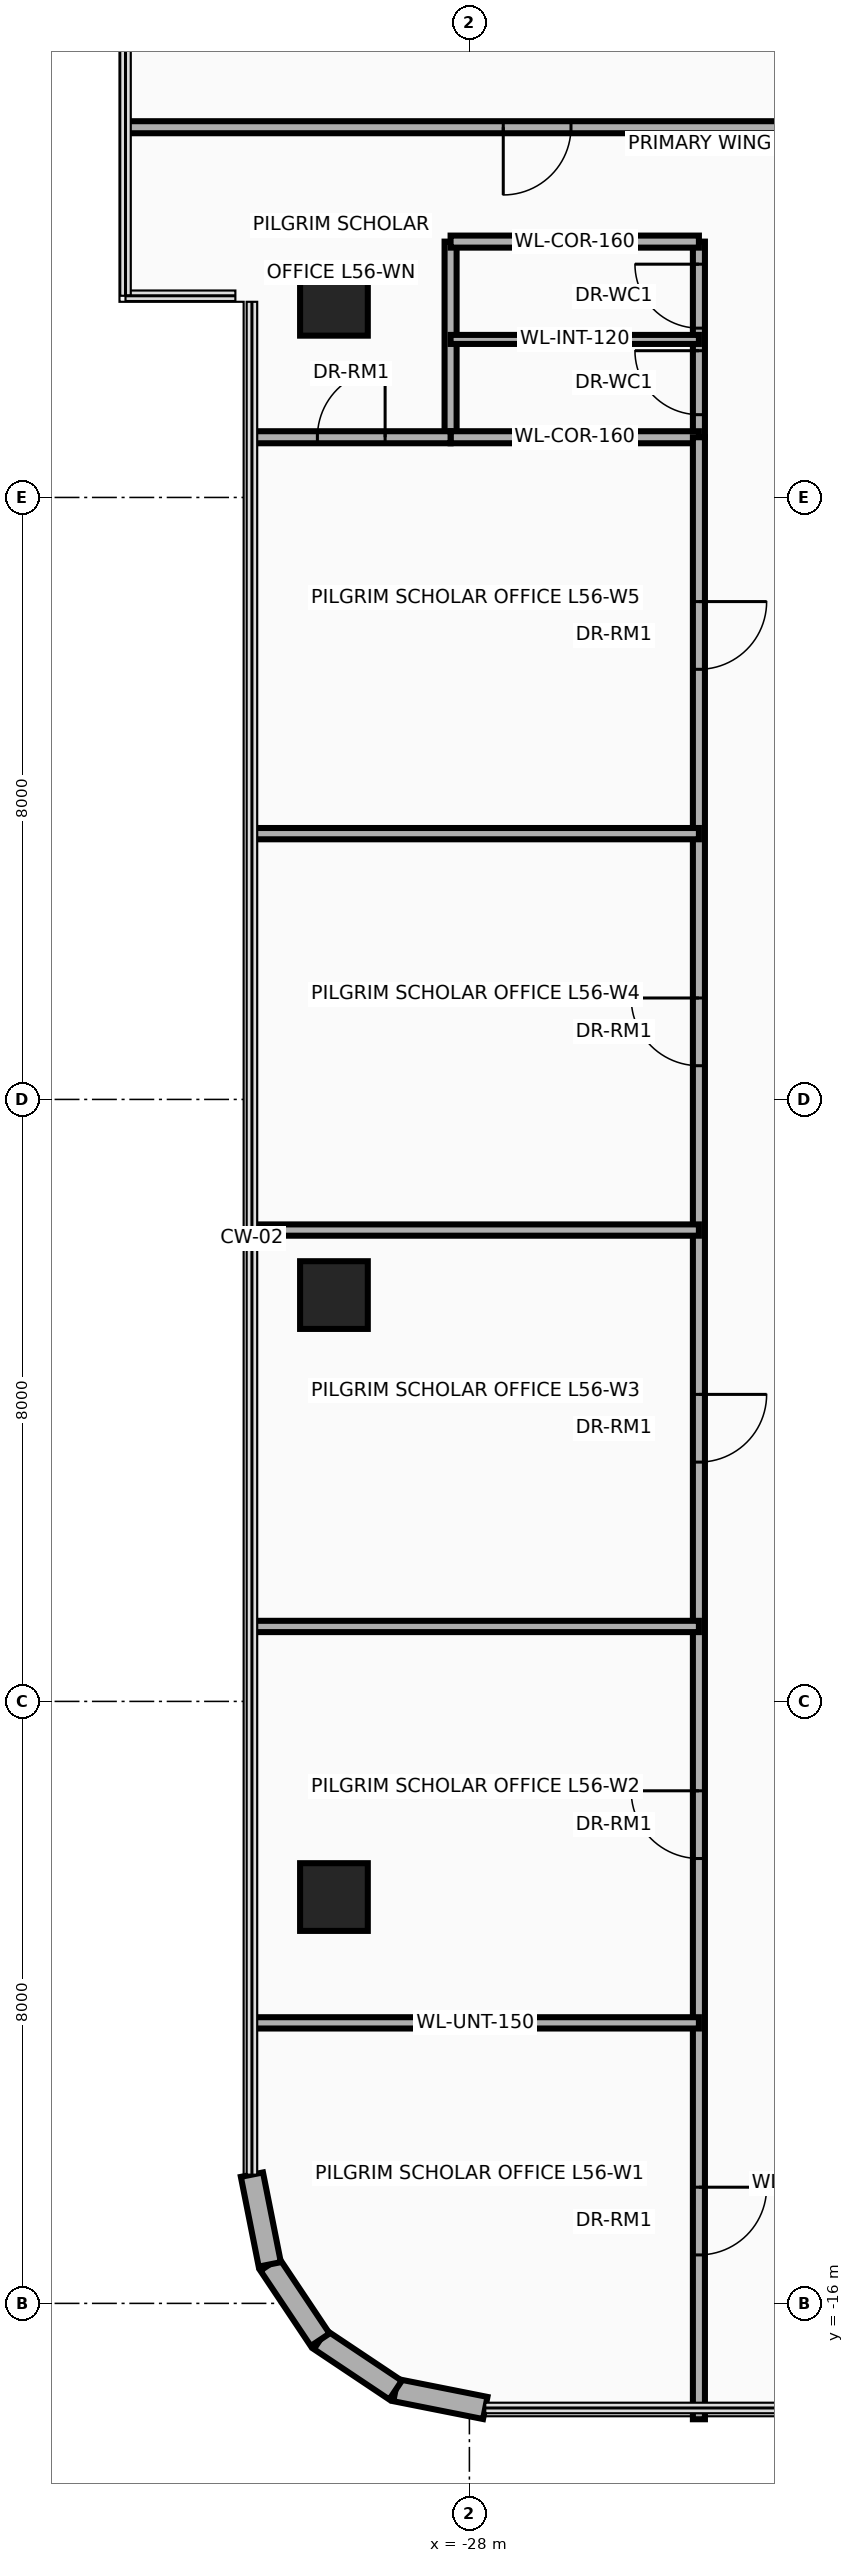
"""IFC4 building model, lengths in metres.
Left out: names, types, materials, properties, quantities, classifications, styles, units other than length and angle.
Written with IfcOpenShell. Run it as: python <this file> out.ifc"""

import sys

from ifc_helpers import new_model, si_unit, direction, frame, frame_2d, origin, origin_2d, place, context, subcontext, project, spatial, rectangle, extrude, source, transform, mapped, element, fill, save


model = new_model("IFC4")
c1 = context("Model", 3, precision=1e-05, world=origin(), true_north=direction((0.0, 1.0)))
c2 = subcontext(c1, "Body", "Model", "MODEL_VIEW")
j1 = project(units=[si_unit("LENGTHUNIT", "METRE"), si_unit("PLANEANGLEUNIT", "RADIAN")], contexts=[c1])
p1 = place(None, origin())
s1 = spatial("IfcSite", under=j1, at=p1, CompositionType="ELEMENT")
p2 = place(p1, origin())
s2 = spatial("IfcBuilding", under=s1, at=p2, CompositionType="ELEMENT")
p3 = place(p2, frame((0.0, 0.0, 219.5)))
s3 = spatial("IfcBuildingStorey", under=s2, at=p3, CompositionType="ELEMENT", Elevation=219.5)
m1 = source(origin(), c2, "Body", "SweptSolid", [
    extrude(rectangle(XDim=0.9, YDim=0.9, at=origin_2d()), origin(), (0.0, 0.0, 1.0), 3.5),
])
for number, where, z_axis, x_axis in (
    (1, (-29.8, -10.6, 0.0), (0.0, 0.0, 1.0), (1.0, 0.0, 0.0)),
    (2, (-29.8, -2.6, 0.0), (0.0, 0.0, 1.0), (1.0, 0.0, 0.0)),
    (3, (-29.8, 10.6, 0.0), (0.0, 0.0, 1.0), (1.0, 0.0, 0.0)),
):
    element("IfcColumn", number, at=place(p3, frame(where, z_axis=z_axis, x_axis=x_axis)), inside=s3, PredefinedType="COLUMN", context=c2, shape_type="MappedRepresentation", body=[
        mapped(m1, transform((0.0, 0.0, 0.0), x_axis=(1.0, 0.0, 0.0), y_axis=(0.0, 1.0, 0.0), z_axis=(0.0, 0.0, 1.0), scale=1.0)),
    ])
p4 = place(p3, frame((-27.789, -17.39, 0.0), z_axis=(0.0, 0.0, 1.0), x_axis=(-0.980804027463, 0.194996050505, 0.0)))
e4 = element("IfcWall", 4, at=p4, inside=s3, PredefinedType="SOLIDWALL", context=c2, shape_type="SweptSolid", body=[
    extrude(rectangle(XDim=1.216, YDim=0.3, at=frame_2d((0.608, 0.0))), origin(), (0.0, 0.0, 1.0), 3.26),
])
for number, where, z_axis, x_axis in (
    (5, (-28.982, -17.153, 0.0), (0.0, 0.0, 1.0), (-0.831, 0.556, 0.0)),
    (6, (-29.983, -16.483, 0.0), (0.0, 0.0, 1.0), (-0.556, 0.831, 0.0)),
):
    element("IfcWall", number, at=place(p3, frame(where, z_axis=z_axis, x_axis=x_axis)), inside=s3, PredefinedType="SOLIDWALL", context=c2, shape_type="SweptSolid", body=[
        extrude(rectangle(XDim=1.205, YDim=0.3, at=frame_2d((0.603, 0.0))), origin(), (0.0, 0.0, 1.0), 3.26),
    ])
p5 = place(p3, frame((-30.653, -15.482, 0.0), z_axis=(0.0, 0.0, 1.0), x_axis=(-0.194996050505, 0.980804027463, 0.0)))
e7 = element("IfcWall", 7, at=p5, inside=s3, PredefinedType="SOLIDWALL", context=c2, shape_type="SweptSolid", body=[
    extrude(rectangle(XDim=1.216, YDim=0.3, at=frame_2d((0.608, 0.0))), origin(), (0.0, 0.0, 1.0), 3.26),
])
p6 = place(p3, frame((-28.25, 8.8, 0.0), z_axis=(0.0, 0.0, 1.0), x_axis=(0.0, 1.0, 0.0)))
e8 = element("IfcWall", 8, at=p6, inside=s3, PredefinedType="PARTITIONING", context=c2, shape_type="SweptSolid", body=[
    extrude(rectangle(XDim=2.6, YDim=0.16, at=frame_2d((1.3, 0.0))), origin(), (0.0, 0.0, 1.0), 2.544),
])
p7 = place(p3, frame((-24.95, 8.8, 0.0), z_axis=(0.0, 0.0, 1.0), x_axis=(0.0, 1.0, 0.0)))
e9 = element("IfcWall", 9, at=p7, inside=s3, PredefinedType="PARTITIONING", context=c2, shape_type="SweptSolid", body=[
    extrude(rectangle(XDim=2.6, YDim=0.16, at=frame_2d((1.3, 0.0))), origin(), (0.0, 0.0, 1.0), 2.544),
])
p8 = place(p7, frame((0.3, 0.0, 0.0)))
e10 = element("IfcOpeningElement", 10, at=p8, cuts=e9, PredefinedType="OPENING", context=c2, shape_type="SweptSolid", body=[
    extrude(rectangle(XDim=0.85, YDim=2.1, at=frame_2d((0.425, 1.05))), frame((0.0, 0.095, 0.0), z_axis=(0.0, -1.0, 0.0), x_axis=(1.0, 0.0, 0.0)), (0.0, 0.0, 1.0), 0.19),
])
p9 = place(p7, frame((1.45, 0.0, 0.0)))
e11 = element("IfcOpeningElement", 11, at=p9, cuts=e9, PredefinedType="OPENING", context=c2, shape_type="SweptSolid", body=[
    extrude(rectangle(XDim=0.85, YDim=2.1, at=frame_2d((0.425, 1.05))), frame((0.0, 0.095, 0.0), z_axis=(0.0, -1.0, 0.0), x_axis=(1.0, 0.0, 0.0)), (0.0, 0.0, 1.0), 0.19),
])
for number, where, z_axis, x_axis in (
    (12, (-28.25, 8.8, 0.0), (0.0, 0.0, 1.0), (1.0, 0.0, 0.0)),
    (13, (-28.25, 11.4, 0.0), (0.0, 0.0, 1.0), (1.0, 0.0, 0.0)),
):
    element("IfcWall", number, at=place(p3, frame(where, z_axis=z_axis, x_axis=x_axis)), inside=s3, PredefinedType="PARTITIONING", context=c2, shape_type="SweptSolid", body=[
        extrude(rectangle(XDim=3.3, YDim=0.16, at=frame_2d((1.65, 0.0))), origin(), (0.0, 0.0, 1.0), 3.26),
    ])
p10 = place(p3, frame((-28.25, 10.1, 0.0), z_axis=(0.0, 0.0, 1.0), x_axis=(1.0, 0.0, 0.0)))
e14 = element("IfcWall", 14, at=p10, inside=s3, PredefinedType="PARTITIONING", context=c2, shape_type="SweptSolid", body=[
    extrude(rectangle(XDim=3.3, YDim=0.12, at=frame_2d((1.65, 0.0))), origin(), (0.0, 0.0, 1.0), 3.26),
])
p11 = place(p3, frame((-24.95, -17.54, 0.0), z_axis=(0.0, 0.0, 1.0), x_axis=(0.0, 1.0, 0.0)))
e15 = element("IfcWall", 15, at=p11, inside=s3, PredefinedType="PARTITIONING", context=c2, shape_type="SweptSolid", body=[
    extrude(rectangle(XDim=26.34, YDim=0.16, at=frame_2d((13.17, 0.0))), origin(), (0.0, 0.0, 1.0), 2.544),
])
p12 = place(p11, frame((2.184, 0.0, 0.0)))
e16 = element("IfcOpeningElement", 16, at=p12, cuts=e15, PredefinedType="OPENING", context=c2, shape_type="SweptSolid", body=[
    extrude(rectangle(XDim=0.9, YDim=2.1, at=frame_2d((0.45, 1.05))), frame((0.0, 0.095, 0.0), z_axis=(0.0, -1.0, 0.0), x_axis=(1.0, 0.0, 0.0)), (0.0, 0.0, 1.0), 0.19),
])
p13 = place(p11, frame((7.452, 0.0, 0.0)))
e17 = element("IfcOpeningElement", 17, at=p13, cuts=e15, PredefinedType="OPENING", context=c2, shape_type="SweptSolid", body=[
    extrude(rectangle(XDim=0.9, YDim=2.1, at=frame_2d((0.45, 1.05))), frame((0.0, 0.095, 0.0), z_axis=(0.0, -1.0, 0.0), x_axis=(1.0, 0.0, 0.0)), (0.0, 0.0, 1.0), 0.19),
])
p14 = place(p11, frame((12.72, 0.0, 0.0)))
e18 = element("IfcOpeningElement", 18, at=p14, cuts=e15, PredefinedType="OPENING", context=c2, shape_type="SweptSolid", body=[
    extrude(rectangle(XDim=0.9, YDim=2.1, at=frame_2d((0.45, 1.05))), frame((0.0, 0.095, 0.0), z_axis=(0.0, -1.0, 0.0), x_axis=(1.0, 0.0, 0.0)), (0.0, 0.0, 1.0), 0.19),
])
p15 = place(p11, frame((17.988, 0.0, 0.0)))
e19 = element("IfcOpeningElement", 19, at=p15, cuts=e15, PredefinedType="OPENING", context=c2, shape_type="SweptSolid", body=[
    extrude(rectangle(XDim=0.9, YDim=2.1, at=frame_2d((0.45, 1.05))), frame((0.0, 0.095, 0.0), z_axis=(0.0, -1.0, 0.0), x_axis=(1.0, 0.0, 0.0)), (0.0, 0.0, 1.0), 0.19),
])
p16 = place(p11, frame((23.256, 0.0, 0.0)))
e20 = element("IfcOpeningElement", 20, at=p16, cuts=e15, PredefinedType="OPENING", context=c2, shape_type="SweptSolid", body=[
    extrude(rectangle(XDim=0.9, YDim=2.1, at=frame_2d((0.45, 1.05))), frame((0.0, 0.095, 0.0), z_axis=(0.0, -1.0, 0.0), x_axis=(1.0, 0.0, 0.0)), (0.0, 0.0, 1.0), 0.19),
])
p17 = place(p3, frame((-30.89, 8.8, 0.0), z_axis=(0.0, 0.0, 1.0), x_axis=(1.0, 0.0, 0.0)))
e21 = element("IfcWall", 21, at=p17, inside=s3, PredefinedType="PARTITIONING", context=c2, shape_type="SweptSolid", body=[
    extrude(rectangle(XDim=2.64, YDim=0.16, at=frame_2d((1.32, 0.0))), origin(), (0.0, 0.0, 1.0), 2.706),
])
p18 = place(p17, frame((0.87, 0.0, 0.0)))
e22 = element("IfcOpeningElement", 22, at=p18, cuts=e21, PredefinedType="OPENING", context=c2, shape_type="SweptSolid", body=[
    extrude(rectangle(XDim=0.9, YDim=2.1, at=frame_2d((0.45, 1.05))), frame((0.0, 0.095, 0.0), z_axis=(0.0, -1.0, 0.0), x_axis=(1.0, 0.0, 0.0)), (0.0, 0.0, 1.0), 0.19),
])
p19 = place(p3, frame((-30.89, -12.272, 0.0), z_axis=(0.0, 0.0, 1.0), x_axis=(1.0, 0.0, 0.0)))
e23 = element("IfcWall", 23, at=p19, inside=s3, PredefinedType="PARTITIONING", context=c2, shape_type="SweptSolid", body=[
    extrude(rectangle(XDim=5.94, YDim=0.15, at=frame_2d((2.97, 0.0))), origin(), (0.0, 0.0, 1.0), 3.26),
])
for number, where, z_axis, x_axis in (
    (24, (-30.89, -7.004, 0.0), (0.0, 0.0, 1.0), (1.0, 0.0, 0.0)),
    (25, (-30.89, -1.736, 0.0), (0.0, 0.0, 1.0), (1.0, 0.0, 0.0)),
    (26, (-30.89, 3.532, 0.0), (0.0, 0.0, 1.0), (1.0, 0.0, 0.0)),
):
    element("IfcWall", number, at=place(p3, frame(where, z_axis=z_axis, x_axis=x_axis)), inside=s3, PredefinedType="PARTITIONING", context=c2, shape_type="SweptSolid", body=[
        extrude(rectangle(XDim=5.94, YDim=0.15, at=frame_2d((2.97, 0.0))), origin(), (0.0, 0.0, 1.0), 2.706),
    ])
p20 = place(p3, frame((-32.54, 12.92, 0.0), z_axis=(0.0, 0.0, 1.0), x_axis=(1.0, 0.0, 0.0)))
e27 = element("IfcWall", 27, at=p20, inside=s3, PredefinedType="PARTITIONING", context=c2, shape_type="SweptSolid", body=[
    extrude(rectangle(XDim=32.93, YDim=0.16, at=frame_2d((16.465, 0.0))), origin(), (0.0, 0.0, 1.0), 2.634),
])
p21 = place(p20, frame((4.99, 0.0, 0.0)))
e28 = element("IfcOpeningElement", 28, at=p21, cuts=e27, PredefinedType="OPENING", context=c2, shape_type="SweptSolid", body=[
    extrude(rectangle(XDim=0.9, YDim=2.1, at=frame_2d((0.45, 1.05))), frame((0.0, 0.095, 0.0), z_axis=(0.0, -1.0, 0.0), x_axis=(1.0, 0.0, 0.0)), (0.0, 0.0, 1.0), 0.19),
])
p22 = place(p20, frame((15.97, 0.0, 0.0)))
e29 = element("IfcOpeningElement", 29, at=p22, cuts=e27, PredefinedType="OPENING", context=c2, shape_type="SweptSolid", body=[
    extrude(rectangle(XDim=0.9, YDim=2.1, at=frame_2d((0.45, 1.05))), frame((0.0, 0.095, 0.0), z_axis=(0.0, -1.0, 0.0), x_axis=(1.0, 0.0, 0.0)), (0.0, 0.0, 1.0), 0.19),
])
p23 = place(p20, frame((26.995, 0.0, 0.0)))
e30 = element("IfcOpeningElement", 30, at=p23, cuts=e27, PredefinedType="OPENING", context=c2, shape_type="SweptSolid", body=[
    extrude(rectangle(XDim=0.9, YDim=2.1, at=frame_2d((0.45, 1.05))), frame((0.0, 0.095, 0.0), z_axis=(0.0, -1.0, 0.0), x_axis=(1.0, 0.0, 0.0)), (0.0, 0.0, 1.0), 0.19),
])
p24 = place(p8, origin())
e31 = element("IfcDoor", 31, at=p24, inside=s3, OperationType="SINGLE_SWING_RIGHT", PredefinedType="DOOR", context=c2, shape_type="SweptSolid", body=[
    extrude(rectangle(XDim=0.85, YDim=2.1, at=frame_2d((0.425, 1.05))), frame((0.0, 0.025, 0.0), z_axis=(0.0, -1.0, 0.0), x_axis=(1.0, 0.0, 0.0)), (0.0, 0.0, 1.0), 0.05),
])
fill(e10, e31)
p25 = place(p9, origin())
e32 = element("IfcDoor", 32, at=p25, inside=s3, OperationType="SINGLE_SWING_LEFT", PredefinedType="DOOR", context=c2, shape_type="SweptSolid", body=[
    extrude(rectangle(XDim=0.85, YDim=2.1, at=frame_2d((0.425, 1.05))), frame((0.0, 0.025, 0.0), z_axis=(0.0, -1.0, 0.0), x_axis=(1.0, 0.0, 0.0)), (0.0, 0.0, 1.0), 0.05),
])
fill(e11, e32)
p26 = place(p18, origin())
e33 = element("IfcDoor", 33, at=p26, inside=s3, OperationType="SINGLE_SWING_RIGHT", PredefinedType="DOOR", context=c2, shape_type="SweptSolid", body=[
    extrude(rectangle(XDim=0.9, YDim=2.1, at=frame_2d((0.45, 1.05))), frame((0.0, 0.025, 0.0), z_axis=(0.0, -1.0, 0.0), x_axis=(1.0, 0.0, 0.0)), (0.0, 0.0, 1.0), 0.05),
])
fill(e22, e33)
p27 = place(p12, frame((0.9, 0.0, 0.0), z_axis=(0.0, 0.0, 1.0), x_axis=(-1.0, 0.0, 0.0)))
e34 = element("IfcDoor", 34, at=p27, inside=s3, OperationType="SINGLE_SWING_LEFT", PredefinedType="DOOR", context=c2, shape_type="SweptSolid", body=[
    extrude(rectangle(XDim=0.9, YDim=2.1, at=frame_2d((0.45, 1.05))), frame((0.0, 0.025, 0.0), z_axis=(0.0, -1.0, 0.0), x_axis=(1.0, 0.0, 0.0)), (0.0, 0.0, 1.0), 0.05),
])
fill(e16, e34)
p28 = place(p13, origin())
e35 = element("IfcDoor", 35, at=p28, inside=s3, OperationType="SINGLE_SWING_RIGHT", PredefinedType="DOOR", context=c2, shape_type="SweptSolid", body=[
    extrude(rectangle(XDim=0.9, YDim=2.1, at=frame_2d((0.45, 1.05))), frame((0.0, 0.025, 0.0), z_axis=(0.0, -1.0, 0.0), x_axis=(1.0, 0.0, 0.0)), (0.0, 0.0, 1.0), 0.05),
])
fill(e17, e35)
p29 = place(p14, frame((0.9, 0.0, 0.0), z_axis=(0.0, 0.0, 1.0), x_axis=(-1.0, 0.0, 0.0)))
e36 = element("IfcDoor", 36, at=p29, inside=s3, OperationType="SINGLE_SWING_LEFT", PredefinedType="DOOR", context=c2, shape_type="SweptSolid", body=[
    extrude(rectangle(XDim=0.9, YDim=2.1, at=frame_2d((0.45, 1.05))), frame((0.0, 0.025, 0.0), z_axis=(0.0, -1.0, 0.0), x_axis=(1.0, 0.0, 0.0)), (0.0, 0.0, 1.0), 0.05),
])
fill(e18, e36)
p30 = place(p15, origin())
e37 = element("IfcDoor", 37, at=p30, inside=s3, OperationType="SINGLE_SWING_RIGHT", PredefinedType="DOOR", context=c2, shape_type="SweptSolid", body=[
    extrude(rectangle(XDim=0.9, YDim=2.1, at=frame_2d((0.45, 1.05))), frame((0.0, 0.025, 0.0), z_axis=(0.0, -1.0, 0.0), x_axis=(1.0, 0.0, 0.0)), (0.0, 0.0, 1.0), 0.05),
])
fill(e19, e37)
p31 = place(p16, frame((0.9, 0.0, 0.0), z_axis=(0.0, 0.0, 1.0), x_axis=(-1.0, 0.0, 0.0)))
e38 = element("IfcDoor", 38, at=p31, inside=s3, OperationType="SINGLE_SWING_LEFT", PredefinedType="DOOR", context=c2, shape_type="SweptSolid", body=[
    extrude(rectangle(XDim=0.9, YDim=2.1, at=frame_2d((0.45, 1.05))), frame((0.0, 0.025, 0.0), z_axis=(0.0, -1.0, 0.0), x_axis=(1.0, 0.0, 0.0)), (0.0, 0.0, 1.0), 0.05),
])
fill(e20, e38)
p32 = place(p21, frame((0.9, 0.0, 0.0), z_axis=(0.0, 0.0, 1.0), x_axis=(-1.0, 0.0, 0.0)))
e39 = element("IfcDoor", 39, at=p32, inside=s3, OperationType="SINGLE_SWING_LEFT", PredefinedType="DOOR", context=c2, shape_type="SweptSolid", body=[
    extrude(rectangle(XDim=0.9, YDim=2.1, at=frame_2d((0.45, 1.05))), frame((0.0, 0.025, 0.0), z_axis=(0.0, -1.0, 0.0), x_axis=(1.0, 0.0, 0.0)), (0.0, 0.0, 1.0), 0.05),
])
fill(e28, e39)
save(model, sys.argv[1])
